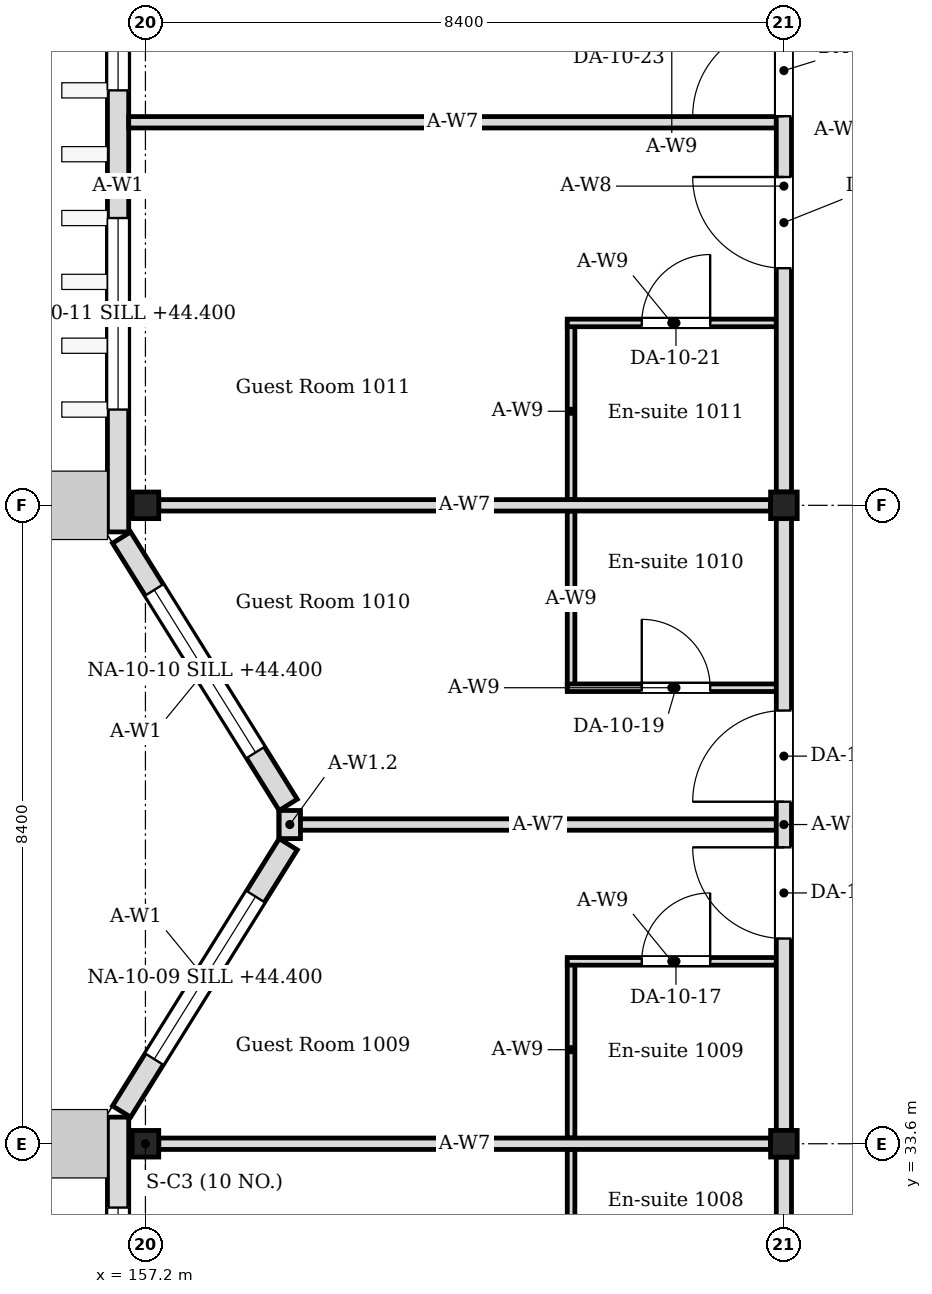
"""IFC4 building model, lengths in metres.
Left out: names, types, materials, properties, quantities, classifications, styles, units other than length and angle.
Written with IfcOpenShell. Run it as: python <this file> out.ifc"""

import sys

from ifc_helpers import new_model, si_unit, direction, frame, frame_2d, origin, origin_2d, place, context, subcontext, project, spatial, rectangle, i_section, extrude, element, fill, save


model = new_model("IFC4")
c1 = context("Model", 3, precision=1e-05, world=origin(), true_north=direction((0.0, 1.0)))
c2 = subcontext(c1, "Body", "Model", "MODEL_VIEW")
j1 = project(units=[si_unit("LENGTHUNIT", "METRE"), si_unit("PLANEANGLEUNIT", "RADIAN")], contexts=[c1])
p1 = place(None, origin())
s1 = spatial("IfcSite", under=j1, at=p1, CompositionType="ELEMENT")
p2 = place(p1, origin())
s2 = spatial("IfcBuilding", under=s1, at=p2, CompositionType="ELEMENT")
p3 = place(p2, frame((0.0, 0.0, 43.8)))
s3 = spatial("IfcBuildingStorey", under=s2, at=p3, CompositionType="ELEMENT", Elevation=43.8)
for number, where, z_axis, x_axis in (
    (1, (157.2, 33.6, 0.0), (0.0, 0.0, 1.0), (1.0, 0.0, 0.0)),
    (2, (157.2, 42.0, 0.0), (0.0, 0.0, 1.0), (1.0, 0.0, 0.0)),
    (3, (165.6, 33.6, 0.0), (0.0, 0.0, 1.0), (1.0, 0.0, 0.0)),
    (4, (165.6, 42.0, 0.0), (0.0, 0.0, 1.0), (1.0, 0.0, 0.0)),
):
    element("IfcColumn", number, at=place(p3, frame(where, z_axis=z_axis, x_axis=x_axis)), inside=s3, PredefinedType="COLUMN", context=c2, shape_type="SweptSolid", body=[
        extrude(i_section(OverallWidth=0.35, OverallDepth=0.35, WebThickness=0.012, FlangeThickness=0.019, FilletRadius=0.013, at=origin_2d()), origin(), (0.0, 0.0, 1.0), 4.2),
    ])
p4 = place(p3, frame((156.84, 24.85, 0.0), z_axis=(0.0, 0.0, 1.0), x_axis=(0.0, 1.0, 0.0)))
e5 = element("IfcWall", 5, at=p4, inside=s3, PredefinedType="SOLIDWALL", context=c2, shape_type="SweptSolid", body=[
    extrude(rectangle(XDim=9.1, YDim=0.28, at=frame_2d((4.55, 0.0))), origin(), (0.0, 0.0, 1.0), 4.05),
])
p5 = place(p4, frame((1.19, 0.0, 0.6)))
e6 = element("IfcOpeningElement", 6, at=p5, cuts=e5, PredefinedType="OPENING", context=c2, shape_type="SweptSolid", body=[
    extrude(rectangle(XDim=2.52, YDim=2.4, at=frame_2d((1.26, 1.2))), frame((0.0, 0.15, 0.0), z_axis=(0.0, -1.0, 0.0), x_axis=(1.0, 0.0, 0.0)), (0.0, 0.0, 1.0), 0.3),
])
p6 = place(p4, frame((5.39, 0.0, 0.6)))
e7 = element("IfcOpeningElement", 7, at=p6, cuts=e5, PredefinedType="OPENING", context=c2, shape_type="SweptSolid", body=[
    extrude(rectangle(XDim=2.52, YDim=2.4, at=frame_2d((1.26, 1.2))), frame((0.0, 0.15, 0.0), z_axis=(0.0, -1.0, 0.0), x_axis=(1.0, 0.0, 0.0)), (0.0, 0.0, 1.0), 0.3),
])
p7 = place(p3, frame((156.886, 34.024, 0.0), z_axis=(0.0, 0.0, 1.0), x_axis=(0.529018946142, 0.848610013271, 0.0)))
e8 = element("IfcWall", 8, at=p7, inside=s3, PredefinedType="SOLIDWALL", context=c2, shape_type="SweptSolid", body=[
    extrude(rectangle(XDim=4.144, YDim=0.28, at=frame_2d((2.072, 0.0))), origin(), (0.0, 0.0, 1.0), 4.05),
])
p8 = place(p7, frame((0.812, 0.0, 0.6)))
e9 = element("IfcOpeningElement", 9, at=p8, cuts=e8, PredefinedType="OPENING", context=c2, shape_type="SweptSolid", body=[
    extrude(rectangle(XDim=2.52, YDim=2.4, at=frame_2d((1.26, 1.2))), frame((0.0, 0.15, 0.0), z_axis=(0.0, -1.0, 0.0), x_axis=(1.0, 0.0, 0.0)), (0.0, 0.0, 1.0), 0.3),
])
p9 = place(p3, frame((159.079, 38.059, 0.0), z_axis=(0.0, 0.0, 1.0), x_axis=(-0.529018946142, 0.848610013271, 0.0)))
e10 = element("IfcWall", 10, at=p9, inside=s3, PredefinedType="SOLIDWALL", context=c2, shape_type="SweptSolid", body=[
    extrude(rectangle(XDim=4.144, YDim=0.28, at=frame_2d((2.072, 0.0))), origin(), (0.0, 0.0, 1.0), 4.05),
])
p10 = place(p9, frame((0.812, 0.0, 0.6)))
e11 = element("IfcOpeningElement", 11, at=p10, cuts=e10, PredefinedType="OPENING", context=c2, shape_type="SweptSolid", body=[
    extrude(rectangle(XDim=2.52, YDim=2.4, at=frame_2d((1.26, 1.2))), frame((0.0, 0.15, 0.0), z_axis=(0.0, -1.0, 0.0), x_axis=(1.0, 0.0, 0.0)), (0.0, 0.0, 1.0), 0.3),
])
p11 = place(p3, frame((159.1, 37.615, 0.0), z_axis=(0.0, 0.0, 1.0), x_axis=(0.0, 1.0, 0.0)))
e12 = element("IfcWall", 12, at=p11, inside=s3, PredefinedType="SOLIDWALL", context=c2, shape_type="SweptSolid", body=[
    extrude(rectangle(XDim=0.37, YDim=0.28, at=frame_2d((0.185, 0.0))), origin(), (0.0, 0.0, 1.0), 3.604),
])
p12 = place(p3, frame((156.84, 41.65, 0.0), z_axis=(0.0, 0.0, 1.0), x_axis=(0.0, 1.0, 0.0)))
e13 = element("IfcWall", 13, at=p12, inside=s3, PredefinedType="SOLIDWALL", context=c2, shape_type="SweptSolid", body=[
    extrude(rectangle(XDim=9.1, YDim=0.28, at=frame_2d((4.55, 0.0))), origin(), (0.0, 0.0, 1.0), 4.05),
])
p13 = place(p12, frame((1.61, 0.0, 0.6)))
e14 = element("IfcOpeningElement", 14, at=p13, cuts=e13, PredefinedType="OPENING", context=c2, shape_type="SweptSolid", body=[
    extrude(rectangle(XDim=2.52, YDim=2.4, at=frame_2d((1.26, 1.2))), frame((0.0, 0.15, 0.0), z_axis=(0.0, -1.0, 0.0), x_axis=(1.0, 0.0, 0.0)), (0.0, 0.0, 1.0), 0.3),
])
p14 = place(p12, frame((5.81, 0.0, 0.6)))
e15 = element("IfcOpeningElement", 15, at=p14, cuts=e13, PredefinedType="OPENING", context=c2, shape_type="SweptSolid", body=[
    extrude(rectangle(XDim=2.52, YDim=2.4, at=frame_2d((1.26, 1.2))), frame((0.0, 0.15, 0.0), z_axis=(0.0, -1.0, 0.0), x_axis=(1.0, 0.0, 0.0)), (0.0, 0.0, 1.0), 0.3),
])
for number, where, z_axis, x_axis in (
    (16, (162.8, 31.2, 0.0), (0.0, 0.0, 1.0), (0.0, 1.0, 0.0)),
    (17, (162.8, 33.675, 0.0), (0.0, 0.0, 1.0), (0.0, 1.0, 0.0)),
):
    element("IfcWall", number, at=place(p3, frame(where, z_axis=z_axis, x_axis=x_axis)), inside=s3, PredefinedType="PARTITIONING", context=c2, shape_type="SweptSolid", body=[
        extrude(rectangle(XDim=2.325, YDim=0.1, at=frame_2d((1.163, 0.0))), origin(), (0.0, 0.0, 1.0), 4.05),
    ])
p15 = place(p3, frame((162.75, 36.0, 0.0), z_axis=(0.0, 0.0, 1.0), x_axis=(1.0, 0.0, 0.0)))
e18 = element("IfcWall", 18, at=p15, inside=s3, PredefinedType="PARTITIONING", context=c2, shape_type="SweptSolid", body=[
    extrude(rectangle(XDim=2.75, YDim=0.1, at=frame_2d((1.375, 0.0))), origin(), (0.0, 0.0, 1.0), 4.05),
])
p16 = place(p15, frame((0.98, 0.0, 0.0)))
e19 = element("IfcOpeningElement", 19, at=p16, cuts=e18, PredefinedType="OPENING", context=c2, shape_type="SweptSolid", body=[
    extrude(rectangle(XDim=0.9, YDim=2.1, at=frame_2d((0.45, 1.05))), frame((0.0, 0.06, 0.0), z_axis=(0.0, -1.0, 0.0), x_axis=(1.0, 0.0, 0.0)), (0.0, 0.0, 1.0), 0.12),
])
p17 = place(p3, frame((162.8, 39.6, 0.0), z_axis=(0.0, 0.0, 1.0), x_axis=(0.0, 1.0, 0.0)))
e20 = element("IfcWall", 20, at=p17, inside=s3, PredefinedType="PARTITIONING", context=c2, shape_type="SweptSolid", body=[
    extrude(rectangle(XDim=2.325, YDim=0.1, at=frame_2d((1.163, 0.0))), origin(), (0.0, 0.0, 1.0), 4.05),
])
p18 = place(p3, frame((162.75, 39.6, 0.0), z_axis=(0.0, 0.0, 1.0), x_axis=(1.0, 0.0, 0.0)))
e21 = element("IfcWall", 21, at=p18, inside=s3, PredefinedType="PARTITIONING", context=c2, shape_type="SweptSolid", body=[
    extrude(rectangle(XDim=2.75, YDim=0.1, at=frame_2d((1.375, 0.0))), origin(), (0.0, 0.0, 1.0), 4.05),
])
p19 = place(p18, frame((0.98, 0.0, 0.0)))
e22 = element("IfcOpeningElement", 22, at=p19, cuts=e21, PredefinedType="OPENING", context=c2, shape_type="SweptSolid", body=[
    extrude(rectangle(XDim=0.9, YDim=2.1, at=frame_2d((0.45, 1.05))), frame((0.0, 0.06, 0.0), z_axis=(0.0, -1.0, 0.0), x_axis=(1.0, 0.0, 0.0)), (0.0, 0.0, 1.0), 0.12),
])
p20 = place(p3, frame((162.8, 42.075, 0.0), z_axis=(0.0, 0.0, 1.0), x_axis=(0.0, 1.0, 0.0)))
e23 = element("IfcWall", 23, at=p20, inside=s3, PredefinedType="PARTITIONING", context=c2, shape_type="SweptSolid", body=[
    extrude(rectangle(XDim=2.325, YDim=0.1, at=frame_2d((1.163, 0.0))), origin(), (0.0, 0.0, 1.0), 4.05),
])
p21 = place(p3, frame((162.75, 44.4, 0.0), z_axis=(0.0, 0.0, 1.0), x_axis=(1.0, 0.0, 0.0)))
e24 = element("IfcWall", 24, at=p21, inside=s3, PredefinedType="PARTITIONING", context=c2, shape_type="SweptSolid", body=[
    extrude(rectangle(XDim=2.75, YDim=0.1, at=frame_2d((1.375, 0.0))), origin(), (0.0, 0.0, 1.0), 4.05),
])
p22 = place(p21, frame((0.98, 0.0, 0.0)))
e25 = element("IfcOpeningElement", 25, at=p22, cuts=e24, PredefinedType="OPENING", context=c2, shape_type="SweptSolid", body=[
    extrude(rectangle(XDim=0.9, YDim=2.1, at=frame_2d((0.45, 1.05))), frame((0.0, 0.06, 0.0), z_axis=(0.0, -1.0, 0.0), x_axis=(1.0, 0.0, 0.0)), (0.0, 0.0, 1.0), 0.12),
])
for number, where, z_axis, x_axis in (
    (26, (157.375, 33.6, 0.0), (0.0, 0.0, 1.0), (1.0, 0.0, 0.0)),
    (27, (157.375, 42.0, 0.0), (0.0, 0.0, 1.0), (1.0, 0.0, 0.0)),
):
    element("IfcWall", number, at=place(p3, frame(where, z_axis=z_axis, x_axis=x_axis)), inside=s3, PredefinedType="PARTITIONING", context=c2, shape_type="SweptSolid", body=[
        extrude(rectangle(XDim=8.05, YDim=0.15, at=frame_2d((4.025, 0.0))), origin(), (0.0, 0.0, 1.0), 3.604),
    ])
p23 = place(p3, frame((159.24, 37.8, 0.0), z_axis=(0.0, 0.0, 1.0), x_axis=(1.0, 0.0, 0.0)))
e28 = element("IfcWall", 28, at=p23, inside=s3, PredefinedType="PARTITIONING", context=c2, shape_type="SweptSolid", body=[
    extrude(rectangle(XDim=6.26, YDim=0.15, at=frame_2d((3.13, 0.0))), origin(), (0.0, 0.0, 1.0), 3.604),
])
p24 = place(p3, frame((156.98, 47.04, 0.0), z_axis=(0.0, 0.0, 1.0), x_axis=(1.0, 0.0, 0.0)))
e29 = element("IfcWall", 29, at=p24, inside=s3, PredefinedType="PARTITIONING", context=c2, shape_type="SweptSolid", body=[
    extrude(rectangle(XDim=8.52, YDim=0.15, at=frame_2d((4.26, 0.0))), origin(), (0.0, 0.0, 1.0), 3.604),
])
p25 = place(p3, frame((165.6, 25.375, 0.0), z_axis=(0.0, 0.0, 1.0), x_axis=(0.0, 1.0, 0.0)))
e30 = element("IfcWall", 30, at=p25, inside=s3, PredefinedType="PARTITIONING", context=c2, shape_type="SweptSolid", body=[
    extrude(rectangle(XDim=8.05, YDim=0.2, at=frame_2d((4.025, 0.0))), origin(), (0.0, 0.0, 1.0), 3.45),
])
p26 = place(p25, frame((2.525, 0.0, 0.0)))
e31 = element("IfcOpeningElement", 31, at=p26, cuts=e30, PredefinedType="OPENING", context=c2, shape_type="SweptSolid", body=[
    extrude(rectangle(XDim=1.2, YDim=2.1, at=frame_2d((0.6, 1.05))), frame((0.0, 0.11, 0.0), z_axis=(0.0, -1.0, 0.0), x_axis=(1.0, 0.0, 0.0)), (0.0, 0.0, 1.0), 0.22),
])
p27 = place(p25, frame((4.325, 0.0, 0.0)))
e32 = element("IfcOpeningElement", 32, at=p27, cuts=e30, PredefinedType="OPENING", context=c2, shape_type="SweptSolid", body=[
    extrude(rectangle(XDim=1.2, YDim=2.1, at=frame_2d((0.6, 1.05))), frame((0.0, 0.11, 0.0), z_axis=(0.0, -1.0, 0.0), x_axis=(1.0, 0.0, 0.0)), (0.0, 0.0, 1.0), 0.22),
])
p28 = place(p3, frame((165.6, 33.775, 0.0), z_axis=(0.0, 0.0, 1.0), x_axis=(0.0, 1.0, 0.0)))
e33 = element("IfcWall", 33, at=p28, inside=s3, PredefinedType="PARTITIONING", context=c2, shape_type="SweptSolid", body=[
    extrude(rectangle(XDim=8.05, YDim=0.2, at=frame_2d((4.025, 0.0))), origin(), (0.0, 0.0, 1.0), 3.45),
])
p29 = place(p28, frame((2.525, 0.0, 0.0)))
e34 = element("IfcOpeningElement", 34, at=p29, cuts=e33, PredefinedType="OPENING", context=c2, shape_type="SweptSolid", body=[
    extrude(rectangle(XDim=1.2, YDim=2.1, at=frame_2d((0.6, 1.05))), frame((0.0, 0.11, 0.0), z_axis=(0.0, -1.0, 0.0), x_axis=(1.0, 0.0, 0.0)), (0.0, 0.0, 1.0), 0.22),
])
p30 = place(p28, frame((4.325, 0.0, 0.0)))
e35 = element("IfcOpeningElement", 35, at=p30, cuts=e33, PredefinedType="OPENING", context=c2, shape_type="SweptSolid", body=[
    extrude(rectangle(XDim=1.2, YDim=2.1, at=frame_2d((0.6, 1.05))), frame((0.0, 0.11, 0.0), z_axis=(0.0, -1.0, 0.0), x_axis=(1.0, 0.0, 0.0)), (0.0, 0.0, 1.0), 0.22),
])
p31 = place(p3, frame((165.6, 42.175, 0.0), z_axis=(0.0, 0.0, 1.0), x_axis=(0.0, 1.0, 0.0)))
e36 = element("IfcWall", 36, at=p31, inside=s3, PredefinedType="PARTITIONING", context=c2, shape_type="SweptSolid", body=[
    extrude(rectangle(XDim=8.05, YDim=0.2, at=frame_2d((4.025, 0.0))), origin(), (0.0, 0.0, 1.0), 3.45),
])
p32 = place(p31, frame((2.945, 0.0, 0.0)))
e37 = element("IfcOpeningElement", 37, at=p32, cuts=e36, PredefinedType="OPENING", context=c2, shape_type="SweptSolid", body=[
    extrude(rectangle(XDim=1.2, YDim=2.1, at=frame_2d((0.6, 1.05))), frame((0.0, 0.11, 0.0), z_axis=(0.0, -1.0, 0.0), x_axis=(1.0, 0.0, 0.0)), (0.0, 0.0, 1.0), 0.22),
])
p33 = place(p31, frame((4.945, 0.0, 0.0)))
e38 = element("IfcOpeningElement", 38, at=p33, cuts=e36, PredefinedType="OPENING", context=c2, shape_type="SweptSolid", body=[
    extrude(rectangle(XDim=1.2, YDim=2.1, at=frame_2d((0.6, 1.05))), frame((0.0, 0.11, 0.0), z_axis=(0.0, -1.0, 0.0), x_axis=(1.0, 0.0, 0.0)), (0.0, 0.0, 1.0), 0.22),
])
p34 = place(p6, origin())
e39 = element("IfcWindow", 39, at=p34, inside=s3, PartitioningType="SINGLE_PANEL", PredefinedType="WINDOW", context=c2, shape_type="SweptSolid", body=[
    extrude(rectangle(XDim=2.52, YDim=2.4, at=frame_2d((1.26, 1.2))), frame((0.0, 0.03, 0.0), z_axis=(0.0, -1.0, 0.0), x_axis=(1.0, 0.0, 0.0)), (0.0, 0.0, 1.0), 0.06),
])
fill(e7, e39)
p35 = place(p8, origin())
e40 = element("IfcWindow", 40, at=p35, inside=s3, PartitioningType="SINGLE_PANEL", PredefinedType="WINDOW", context=c2, shape_type="SweptSolid", body=[
    extrude(rectangle(XDim=2.52, YDim=2.4, at=frame_2d((1.26, 1.2))), frame((0.0, 0.03, 0.0), z_axis=(0.0, -1.0, 0.0), x_axis=(1.0, 0.0, 0.0)), (0.0, 0.0, 1.0), 0.06),
])
fill(e9, e40)
p36 = place(p10, origin())
e41 = element("IfcWindow", 41, at=p36, inside=s3, PartitioningType="SINGLE_PANEL", PredefinedType="WINDOW", context=c2, shape_type="SweptSolid", body=[
    extrude(rectangle(XDim=2.52, YDim=2.4, at=frame_2d((1.26, 1.2))), frame((0.0, 0.03, 0.0), z_axis=(0.0, -1.0, 0.0), x_axis=(1.0, 0.0, 0.0)), (0.0, 0.0, 1.0), 0.06),
])
fill(e11, e41)
p37 = place(p13, origin())
e42 = element("IfcWindow", 42, at=p37, inside=s3, PartitioningType="SINGLE_PANEL", PredefinedType="WINDOW", context=c2, shape_type="SweptSolid", body=[
    extrude(rectangle(XDim=2.52, YDim=2.4, at=frame_2d((1.26, 1.2))), frame((0.0, 0.03, 0.0), z_axis=(0.0, -1.0, 0.0), x_axis=(1.0, 0.0, 0.0)), (0.0, 0.0, 1.0), 0.06),
])
fill(e14, e42)
p38 = place(p14, origin())
e43 = element("IfcWindow", 43, at=p38, inside=s3, PartitioningType="SINGLE_PANEL", PredefinedType="WINDOW", context=c2, shape_type="SweptSolid", body=[
    extrude(rectangle(XDim=2.52, YDim=2.4, at=frame_2d((1.26, 1.2))), frame((0.0, 0.03, 0.0), z_axis=(0.0, -1.0, 0.0), x_axis=(1.0, 0.0, 0.0)), (0.0, 0.0, 1.0), 0.06),
])
fill(e15, e43)
p39 = place(p16, origin())
e44 = element("IfcDoor", 44, at=p39, inside=s3, OperationType="SINGLE_SWING_RIGHT", PredefinedType="DOOR", context=c2, shape_type="SweptSolid", body=[
    extrude(rectangle(XDim=0.9, YDim=2.1, at=frame_2d((0.45, 1.05))), frame((0.0, 0.025, 0.0), z_axis=(0.0, -1.0, 0.0), x_axis=(1.0, 0.0, 0.0)), (0.0, 0.0, 1.0), 0.05),
])
fill(e19, e44)
p40 = place(p29, origin())
e45 = element("IfcDoor", 45, at=p40, inside=s3, OperationType="SINGLE_SWING_RIGHT", PredefinedType="DOOR", context=c2, shape_type="SweptSolid", body=[
    extrude(rectangle(XDim=1.2, YDim=2.1, at=frame_2d((0.6, 1.05))), frame((0.0, 0.025, 0.0), z_axis=(0.0, -1.0, 0.0), x_axis=(1.0, 0.0, 0.0)), (0.0, 0.0, 1.0), 0.05),
])
fill(e34, e45)
p41 = place(p19, origin())
e46 = element("IfcDoor", 46, at=p41, inside=s3, OperationType="SINGLE_SWING_LEFT", PredefinedType="DOOR", context=c2, shape_type="SweptSolid", body=[
    extrude(rectangle(XDim=0.9, YDim=2.1, at=frame_2d((0.45, 1.05))), frame((0.0, 0.025, 0.0), z_axis=(0.0, -1.0, 0.0), x_axis=(1.0, 0.0, 0.0)), (0.0, 0.0, 1.0), 0.05),
])
fill(e22, e46)
p42 = place(p30, origin())
e47 = element("IfcDoor", 47, at=p42, inside=s3, OperationType="SINGLE_SWING_LEFT", PredefinedType="DOOR", context=c2, shape_type="SweptSolid", body=[
    extrude(rectangle(XDim=1.2, YDim=2.1, at=frame_2d((0.6, 1.05))), frame((0.0, 0.025, 0.0), z_axis=(0.0, -1.0, 0.0), x_axis=(1.0, 0.0, 0.0)), (0.0, 0.0, 1.0), 0.05),
])
fill(e35, e47)
p43 = place(p22, origin())
e48 = element("IfcDoor", 48, at=p43, inside=s3, OperationType="SINGLE_SWING_RIGHT", PredefinedType="DOOR", context=c2, shape_type="SweptSolid", body=[
    extrude(rectangle(XDim=0.9, YDim=2.1, at=frame_2d((0.45, 1.05))), frame((0.0, 0.025, 0.0), z_axis=(0.0, -1.0, 0.0), x_axis=(1.0, 0.0, 0.0)), (0.0, 0.0, 1.0), 0.05),
])
fill(e25, e48)
p44 = place(p32, origin())
e49 = element("IfcDoor", 49, at=p44, inside=s3, OperationType="SINGLE_SWING_RIGHT", PredefinedType="DOOR", context=c2, shape_type="SweptSolid", body=[
    extrude(rectangle(XDim=1.2, YDim=2.1, at=frame_2d((0.6, 1.05))), frame((0.0, 0.025, 0.0), z_axis=(0.0, -1.0, 0.0), x_axis=(1.0, 0.0, 0.0)), (0.0, 0.0, 1.0), 0.05),
])
fill(e37, e49)
p45 = place(p33, origin())
e50 = element("IfcDoor", 50, at=p45, inside=s3, OperationType="SINGLE_SWING_LEFT", PredefinedType="DOOR", context=c2, shape_type="SweptSolid", body=[
    extrude(rectangle(XDim=1.2, YDim=2.1, at=frame_2d((0.6, 1.05))), frame((0.0, 0.025, 0.0), z_axis=(0.0, -1.0, 0.0), x_axis=(1.0, 0.0, 0.0)), (0.0, 0.0, 1.0), 0.05),
])
fill(e38, e50)
save(model, sys.argv[1])
